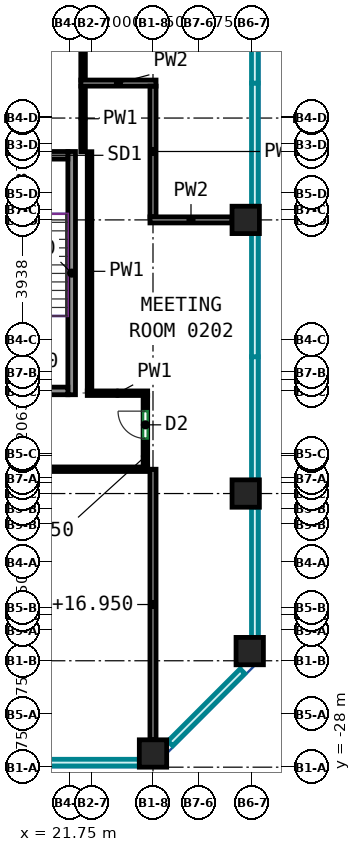
"""IFC4 building model, lengths in metres.
Left out: names, types, materials, properties, quantities, classifications, styles, units other than length and angle.
Written with IfcOpenShell. Run it as: python <this file> out.ifc"""

import sys

from ifc_helpers import new_model, si_unit, direction, frame, frame_2d, origin, origin_2d, place, context, subcontext, project, spatial, rectangle, extrude, source, transform, mapped, element, fill, save


model = new_model("IFC4")
c1 = context("Model", 3, precision=1e-05, world=origin(), true_north=direction((0.0, 1.0)))
c2 = subcontext(c1, "Body", "Model", "MODEL_VIEW")
j1 = project(units=[si_unit("LENGTHUNIT", "METRE"), si_unit("PLANEANGLEUNIT", "RADIAN")], contexts=[c1])
p1 = place(None, origin())
s1 = spatial("IfcSite", under=j1, at=p1, CompositionType="ELEMENT")
p2 = place(p1, origin())
s2 = spatial("IfcBuilding", under=s1, at=p2, CompositionType="ELEMENT")
p3 = place(p2, frame((0.0, 0.0, 13.5)))
s3 = spatial("IfcBuildingStorey", under=s2, at=p3, CompositionType="ELEMENT", Elevation=13.5)
m1 = source(origin(), c2, "Body", "SweptSolid", [
    extrude(rectangle(XDim=0.9, YDim=0.9, at=origin_2d()), origin(), (0.0, 0.0, 1.0), 4.1),
])
for number, where, z_axis, x_axis in (
    (1, (24.5, -27.55, 0.0), (0.0, 0.0, 1.0), (1.0, 0.0, 0.0)),
    (2, (27.55, -19.0, 0.0), (0.0, 0.0, 1.0), (1.0, 0.0, 0.0)),
    (3, (27.55, -10.0, 0.0), (0.0, 0.0, 1.0), (1.0, 0.0, 0.0)),
    (4, (27.682, -24.182, 0.0), (0.0, 0.0, 1.0), (1.0, 0.0, 0.0)),
):
    element("IfcColumn", number, at=place(p3, frame(where, z_axis=z_axis, x_axis=x_axis)), inside=s3, PredefinedType="COLUMN", context=c2, shape_type="MappedRepresentation", body=[
        mapped(m1, transform((0.0, 0.0, 0.0))),
    ])
m2 = source(origin(), c2, "Body", "SweptSolid", [
    extrude(rectangle(XDim=8.0, YDim=0.25, at=frame_2d((4.0, 0.0))), origin(), (0.0, 0.0, 1.0), 4.1),
])
p4 = place(p3, frame((21.825, -15.75, 0.0), z_axis=(0.0, 0.0, 1.0), x_axis=(0.0, 1.0, 0.0)))
e5 = element("IfcWall", 5, at=p4, inside=s3, PredefinedType="SHEAR", context=c2, shape_type="MappedRepresentation", body=[
    mapped(m2, transform((0.0, 0.0, 0.0))),
])
m3 = source(origin(), c2, "Body", "SweptSolid", [
    extrude(rectangle(XDim=3.7, YDim=0.25, at=frame_2d((1.85, 0.0))), origin(), (0.0, 0.0, 1.0), 4.1),
])
p5 = place(p3, frame((18.0, -15.625, 0.0), z_axis=(0.0, 0.0, 1.0), x_axis=(1.0, 0.0, 0.0)))
e6 = element("IfcWall", 6, at=p5, inside=s3, PredefinedType="SHEAR", context=c2, shape_type="MappedRepresentation", body=[
    mapped(m3, transform((0.0, 0.0, 0.0))),
])
p6 = place(p3, frame((18.0, -7.875, 0.0), z_axis=(0.0, 0.0, 1.0), x_axis=(1.0, 0.0, 0.0)))
e7 = element("IfcWall", 7, at=p6, inside=s3, PredefinedType="SHEAR", context=c2, shape_type="MappedRepresentation", body=[
    mapped(m3, transform((0.0, 0.0, 0.0))),
])
p7 = place(p6, frame((1.25, 0.0, 0.0)))
e8 = element("IfcOpeningElement", 8, at=p7, cuts=e7, PredefinedType="OPENING", context=c2, shape_type="SweptSolid", body=[
    extrude(rectangle(XDim=1.2, YDim=2.1, at=frame_2d((0.6, 1.05))), frame((0.0, 0.135, 0.0), z_axis=(0.0, -1.0, 0.0), x_axis=(1.0, 0.0, 0.0)), (0.0, 0.0, 1.0), 0.27),
])
p8 = place(p3, frame((-24.325, -18.2, 0.0), z_axis=(0.0, 0.0, 1.0), x_axis=(1.0, 0.0, 0.0)))
e9 = element("IfcWall", 9, at=p8, inside=s3, PredefinedType="PARTITIONING", context=c2, shape_type="SweptSolid", body=[
    extrude(rectangle(XDim=48.65, YDim=0.15, at=frame_2d((24.325, 0.0))), origin(), (0.0, 0.0, 1.0), 4.1),
])
p9 = place(p8, frame((11.314, 0.0, 0.0)))
e10 = element("IfcOpeningElement", 10, at=p9, cuts=e9, PredefinedType="OPENING", context=c2, shape_type="SweptSolid", body=[
    extrude(rectangle(XDim=0.9, YDim=2.1, at=frame_2d((0.45, 1.05))), frame((0.0, 0.085, 0.0), z_axis=(0.0, -1.0, 0.0), x_axis=(1.0, 0.0, 0.0)), (0.0, 0.0, 1.0), 0.17),
])
p10 = place(p8, frame((14.916, 0.0, 0.0)))
e11 = element("IfcOpeningElement", 11, at=p10, cuts=e9, PredefinedType="OPENING", context=c2, shape_type="SweptSolid", body=[
    extrude(rectangle(XDim=1.8, YDim=2.1, at=frame_2d((0.9, 1.05))), frame((0.0, 0.085, 0.0), z_axis=(0.0, -1.0, 0.0), x_axis=(1.0, 0.0, 0.0)), (0.0, 0.0, 1.0), 0.17),
])
p11 = place(p3, frame((22.2, -7.757, 0.0), z_axis=(0.0, 0.0, 1.0), x_axis=(0.0, 1.0, 0.0)))
e12 = element("IfcWall", 12, at=p11, inside=s3, PredefinedType="PARTITIONING", context=c2, shape_type="SweptSolid", body=[
    extrude(rectangle(XDim=2.167, YDim=0.15, at=frame_2d((1.083, 0.0))), origin(), (0.0, 0.0, 1.0), 4.1),
])
p12 = place(p3, frame((22.413, -15.625, 0.0), z_axis=(0.0, 0.0, 1.0), x_axis=(0.0, 1.0, 0.0)))
e13 = element("IfcWall", 13, at=p12, inside=s3, PredefinedType="PARTITIONING", context=c2, shape_type="SweptSolid", body=[
    extrude(rectangle(XDim=7.868, YDim=0.15, at=frame_2d((3.934, 0.0))), origin(), (0.0, 0.0, 1.0), 4.1),
])
p13 = place(p3, frame((22.338, -15.7, 0.0), z_axis=(0.0, 0.0, 1.0), x_axis=(1.0, 0.0, 0.0)))
e14 = element("IfcWall", 14, at=p13, inside=s3, PredefinedType="PARTITIONING", context=c2, shape_type="SweptSolid", body=[
    extrude(rectangle(XDim=1.987, YDim=0.15, at=frame_2d((0.994, 0.0))), origin(), (0.0, 0.0, 1.0), 4.1),
])
p14 = place(p3, frame((24.25, -18.125, 0.0), z_axis=(0.0, 0.0, 1.0), x_axis=(0.0, 1.0, 0.0)))
e15 = element("IfcWall", 15, at=p14, inside=s3, PredefinedType="PARTITIONING", context=c2, shape_type="SweptSolid", body=[
    extrude(rectangle(XDim=2.35, YDim=0.15, at=frame_2d((1.175, 0.0))), origin(), (0.0, 0.0, 1.0), 3.45),
])
p15 = place(p14, frame((0.935, 0.0, 0.0)))
e16 = element("IfcOpeningElement", 16, at=p15, cuts=e15, PredefinedType="OPENING", context=c2, shape_type="SweptSolid", body=[
    extrude(rectangle(XDim=0.9, YDim=2.1, at=frame_2d((0.45, 1.05))), frame((0.0, 0.085, 0.0), z_axis=(0.0, -1.0, 0.0), x_axis=(1.0, 0.0, 0.0)), (0.0, 0.0, 1.0), 0.17),
])
p16 = place(p3, frame((22.2, -5.41, 0.0), z_axis=(0.0, 0.0, 1.0), x_axis=(0.0, 1.0, 0.0)))
e17 = element("IfcWall", 17, at=p16, inside=s3, PredefinedType="PARTITIONING", context=c2, shape_type="SweptSolid", body=[
    extrude(rectangle(XDim=4.32, YDim=0.15, at=frame_2d((2.16, 0.0))), origin(), (0.0, 0.0, 1.0), 4.1),
])
p17 = place(p16, frame((1.207, 0.0, 0.0)))
e18 = element("IfcOpeningElement", 18, at=p17, cuts=e17, PredefinedType="OPENING", context=c2, shape_type="SweptSolid", body=[
    extrude(rectangle(XDim=0.9, YDim=2.1, at=frame_2d((0.45, 1.05))), frame((0.0, 0.085, 0.0), z_axis=(0.0, -1.0, 0.0), x_axis=(1.0, 0.0, 0.0)), (0.0, 0.0, 1.0), 0.17),
])
p18 = place(p3, frame((24.5, -27.1, 0.0), z_axis=(0.0, 0.0, 1.0), x_axis=(0.0, 1.0, 0.0)))
e19 = element("IfcWall", 19, at=p18, inside=s3, PredefinedType="PARTITIONING", context=c2, shape_type="SweptSolid", body=[
    extrude(rectangle(XDim=8.9, YDim=0.2, at=frame_2d((4.45, 0.0))), origin(), (0.0, 0.0, 1.0), 3.45),
])
p19 = place(p3, frame((22.126, -5.5, 0.0), z_axis=(0.0, 0.0, 1.0), x_axis=(1.0, 0.0, 0.0)))
e20 = element("IfcWall", 20, at=p19, inside=s3, PredefinedType="PARTITIONING", context=c2, shape_type="SweptSolid", body=[
    extrude(rectangle(XDim=2.474, YDim=0.2, at=frame_2d((1.237, 0.0))), origin(), (0.0, 0.0, 1.0), 4.1),
])
p20 = place(p3, frame((24.5, -9.9, 0.0), z_axis=(0.0, 0.0, 1.0), x_axis=(0.0, 1.0, 0.0)))
e21 = element("IfcWall", 21, at=p20, inside=s3, PredefinedType="PARTITIONING", context=c2, shape_type="SweptSolid", body=[
    extrude(rectangle(XDim=4.3, YDim=0.2, at=frame_2d((2.15, 0.0))), origin(), (0.0, 0.0, 1.0), 3.45),
])
p21 = place(p3, frame((24.4, -10.0, 0.0), z_axis=(0.0, 0.0, 1.0), x_axis=(1.0, 0.0, 0.0)))
e22 = element("IfcWall", 22, at=p21, inside=s3, PredefinedType="PARTITIONING", context=c2, shape_type="SweptSolid", body=[
    extrude(rectangle(XDim=2.7, YDim=0.2, at=frame_2d((1.35, 0.0))), origin(), (0.0, 0.0, 1.0), 4.1),
])
p22 = place(p15, origin())
e23 = element("IfcDoor", 23, at=p22, inside=s3, OperationType="SINGLE_SWING_RIGHT", PredefinedType="DOOR", context=c2, shape_type="SweptSolid", body=[
    extrude(rectangle(XDim=0.9, YDim=2.1, at=frame_2d((0.45, 1.05))), frame((0.0, 0.025, 0.0), z_axis=(0.0, -1.0, 0.0), x_axis=(1.0, 0.0, 0.0)), (0.0, 0.0, 1.0), 0.05),
])
fill(e16, e23)
save(model, sys.argv[1])
